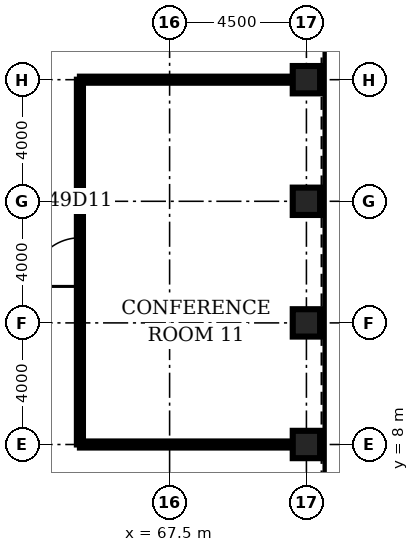
"""IFC4 building model, lengths in metres.
Left out: names, types, materials, properties, quantities, classifications, styles, units other than length and angle.
Written with IfcOpenShell. Run it as: python <this file> out.ifc"""

import sys

from ifc_helpers import new_model, si_unit, direction, frame, frame_2d, origin, origin_2d, place, context, subcontext, project, spatial, rectangle, hollow_rectangle, extrude, element, fill, save


model = new_model("IFC4")
c1 = context("Model", 3, precision=1e-05, world=origin(), true_north=direction((0.0, 1.0)))
c2 = subcontext(c1, "Body", "Model", "MODEL_VIEW")
j1 = project(units=[si_unit("LENGTHUNIT", "METRE"), si_unit("PLANEANGLEUNIT", "RADIAN")], contexts=[c1])
p1 = place(None, origin())
s1 = spatial("IfcSite", under=j1, at=p1, CompositionType="ELEMENT")
p2 = place(p1, origin())
s2 = spatial("IfcBuilding", under=s1, at=p2, CompositionType="ELEMENT")
p3 = place(p2, frame((0.0, 0.0, 219.4)))
s3 = spatial("IfcBuildingStorey", under=s2, at=p3, CompositionType="ELEMENT", Elevation=219.4)
for number, where, z_axis, x_axis in (
    (1, (72.0, 8.0, 0.0), (0.0, 0.0, 1.0), (1.0, 0.0, 0.0)),
    (2, (72.0, 12.0, 0.0), (0.0, 0.0, 1.0), (1.0, 0.0, 0.0)),
    (3, (72.0, 16.0, 0.0), (0.0, 0.0, 1.0), (1.0, 0.0, 0.0)),
    (4, (72.0, 20.0, 0.0), (0.0, 0.0, 1.0), (1.0, 0.0, 0.0)),
):
    element("IfcColumn", number, at=place(p3, frame(where, z_axis=z_axis, x_axis=x_axis)), inside=s3, PredefinedType="COLUMN", context=c2, shape_type="SweptSolid", body=[
        extrude(hollow_rectangle(XDim=0.9, YDim=0.9, WallThickness=0.08, at=origin_2d()), origin(), (0.0, 0.0, 1.0), 4.2),
    ])
for number, where, z_axis, x_axis in (
    (5, (64.55, 8.0, 0.0), (0.0, 0.0, 1.0), (1.0, 0.0, 0.0)),
    (6, (64.55, 20.0, 0.0), (0.0, 0.0, 1.0), (1.0, 0.0, 0.0)),
):
    element("IfcWall", number, at=place(p3, frame(where, z_axis=z_axis, x_axis=x_axis)), inside=s3, PredefinedType="PARTITIONING", context=c2, shape_type="SweptSolid", body=[
        extrude(rectangle(XDim=7.0, YDim=0.2, at=frame_2d((3.5, 0.0))), origin(), (0.0, 0.0, 1.0), 3.0),
    ])
p4 = place(p3, frame((64.55, 8.0, 0.0), z_axis=(0.0, 0.0, 1.0), x_axis=(0.0, 1.0, 0.0)))
e7 = element("IfcWall", 7, at=p4, inside=s3, PredefinedType="PARTITIONING", context=c2, shape_type="SweptSolid", body=[
    extrude(rectangle(XDim=12.0, YDim=0.2, at=frame_2d((6.0, 0.0))), origin(), (0.0, 0.0, 1.0), 3.0),
])
p5 = place(p4, frame((5.2, 0.0, 0.0)))
e8 = element("IfcOpeningElement", 8, at=p5, cuts=e7, PredefinedType="OPENING", context=c2, shape_type="SweptSolid", body=[
    extrude(rectangle(XDim=1.6, YDim=2.1, at=frame_2d((0.8, 1.05))), frame((0.0, 0.11, 0.0), z_axis=(0.0, -1.0, 0.0), x_axis=(1.0, 0.0, 0.0)), (0.0, 0.0, 1.0), 0.22),
])
p6 = place(p5, origin())
e9 = element("IfcDoor", 9, at=p6, inside=s3, OperationType="SINGLE_SWING_LEFT", PredefinedType="DOOR", context=c2, shape_type="SweptSolid", body=[
    extrude(rectangle(XDim=1.6, YDim=2.1, at=frame_2d((0.8, 1.05))), frame((0.0, 0.025, 0.0), z_axis=(0.0, -1.0, 0.0), x_axis=(1.0, 0.0, 0.0)), (0.0, 0.0, 1.0), 0.05),
])
fill(e8, e9)
save(model, sys.argv[1])
